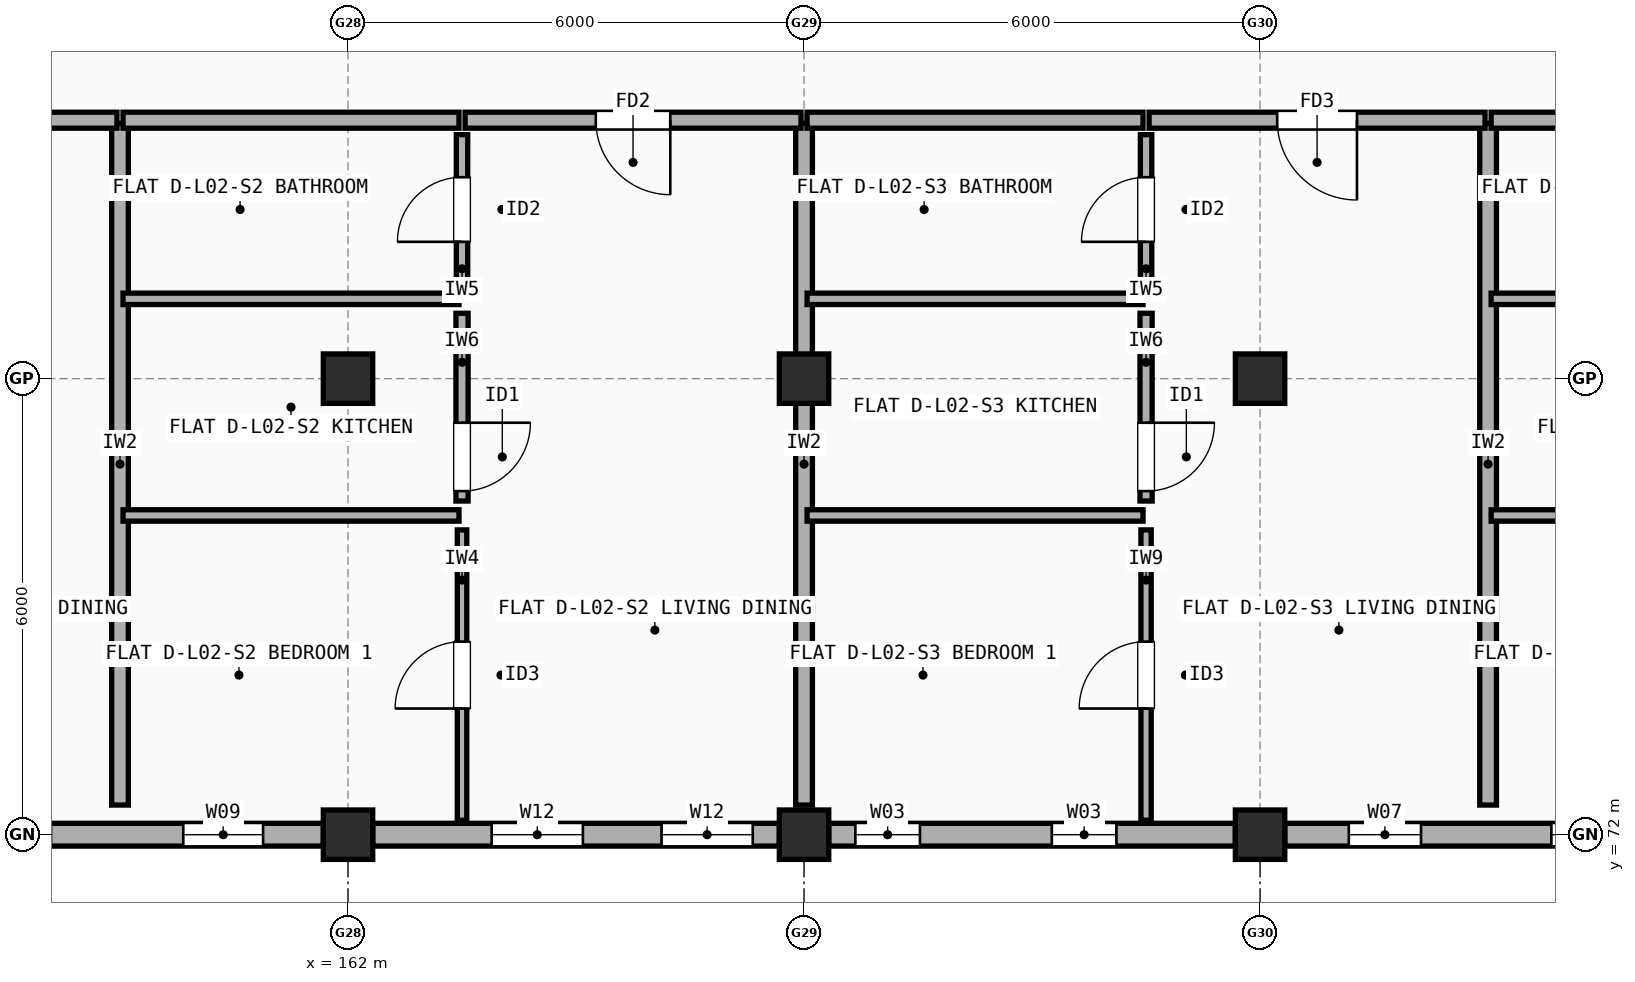
"""IFC4 building model, lengths in metres.
Left out: names, types, materials, properties, quantities, classifications, styles, units other than length and angle.
Written with IfcOpenShell. Run it as: python <this file> out.ifc"""

import sys

from ifc_helpers import new_model, si_unit, direction, frame, frame_2d, origin, origin_2d, place, context, subcontext, project, spatial, rectangle, extrude, element, fill, save


model = new_model("IFC4")
c1 = context("Model", 3, precision=1e-05, world=origin(), true_north=direction((0.0, 1.0)))
c2 = subcontext(c1, "Body", "Model", "MODEL_VIEW")
j1 = project(units=[si_unit("LENGTHUNIT", "METRE"), si_unit("PLANEANGLEUNIT", "RADIAN")], contexts=[c1])
p1 = place(None, origin())
s1 = spatial("IfcSite", under=j1, at=p1, CompositionType="ELEMENT")
p2 = place(p1, origin())
s2 = spatial("IfcBuilding", under=s1, at=p2, CompositionType="ELEMENT")
p3 = place(p2, frame((0.0, 0.0, 7.7)))
s3 = spatial("IfcBuildingStorey", under=s2, at=p3, CompositionType="ELEMENT", Elevation=7.7)
for number, where, z_axis, x_axis in (
    (1, (162.0, 72.0, 0.0), (0.0, 0.0, 1.0), (1.0, 0.0, 0.0)),
    (2, (162.0, 78.0, 0.0), (0.0, 0.0, 1.0), (1.0, 0.0, 0.0)),
    (3, (168.0, 72.0, 0.0), (0.0, 0.0, 1.0), (1.0, 0.0, 0.0)),
    (4, (168.0, 78.0, 0.0), (0.0, 0.0, 1.0), (1.0, 0.0, 0.0)),
    (5, (174.0, 72.0, 0.0), (0.0, 0.0, 1.0), (1.0, 0.0, 0.0)),
    (6, (174.0, 78.0, 0.0), (0.0, 0.0, 1.0), (1.0, 0.0, 0.0)),
):
    element("IfcColumn", number, at=place(p3, frame(where, z_axis=z_axis, x_axis=x_axis)), inside=s3, PredefinedType="COLUMN", context=c2, shape_type="SweptSolid", body=[
        extrude(rectangle(XDim=0.65, YDim=0.65, at=origin_2d()), origin(), (0.0, 0.0, 1.0), 2.955),
    ])
p4 = place(p3, frame((156.275, 72.0, 0.0), z_axis=(0.0, 0.0, 1.0), x_axis=(1.0, 0.0, 0.0)))
e7 = element("IfcWall", 7, at=p4, inside=s3, PredefinedType="STANDARD", context=c2, shape_type="SweptSolid", body=[
    extrude(rectangle(XDim=5.4, YDim=0.3, at=frame_2d((2.7, 0.0))), origin(), (0.0, 0.0, 1.0), 2.437),
])
p5 = place(p4, frame((0.867, 0.0, 0.9)))
e8 = element("IfcOpeningElement", 8, at=p5, cuts=e7, PredefinedType="OPENING", context=c2, shape_type="SweptSolid", body=[
    extrude(rectangle(XDim=0.95, YDim=1.35, at=frame_2d((0.475, 0.675))), frame((0.0, 0.16, 0.0), z_axis=(0.0, -1.0, 0.0), x_axis=(1.0, 0.0, 0.0)), (0.0, 0.0, 1.0), 0.32),
])
p6 = place(p4, frame((3.558, 0.0, 0.9)))
e9 = element("IfcOpeningElement", 9, at=p6, cuts=e7, PredefinedType="OPENING", context=c2, shape_type="SweptSolid", body=[
    extrude(rectangle(XDim=1.05, YDim=1.35, at=frame_2d((0.525, 0.675))), frame((0.0, 0.16, 0.0), z_axis=(0.0, -1.0, 0.0), x_axis=(1.0, 0.0, 0.0)), (0.0, 0.0, 1.0), 0.32),
])
p7 = place(p3, frame((162.325, 72.0, 0.0), z_axis=(0.0, 0.0, 1.0), x_axis=(1.0, 0.0, 0.0)))
e10 = element("IfcWall", 10, at=p7, inside=s3, PredefinedType="STANDARD", context=c2, shape_type="SweptSolid", body=[
    extrude(rectangle(XDim=5.35, YDim=0.3, at=frame_2d((2.675, 0.0))), origin(), (0.0, 0.0, 1.0), 2.437),
])
p8 = place(p7, frame((1.565, 0.0, 0.9)))
e11 = element("IfcOpeningElement", 11, at=p8, cuts=e10, PredefinedType="OPENING", context=c2, shape_type="SweptSolid", body=[
    extrude(rectangle(XDim=1.2, YDim=1.35, at=frame_2d((0.6, 0.675))), frame((0.0, 0.16, 0.0), z_axis=(0.0, -1.0, 0.0), x_axis=(1.0, 0.0, 0.0)), (0.0, 0.0, 1.0), 0.32),
])
p9 = place(p7, frame((3.8, 0.0, 0.9)))
e12 = element("IfcOpeningElement", 12, at=p9, cuts=e10, PredefinedType="OPENING", context=c2, shape_type="SweptSolid", body=[
    extrude(rectangle(XDim=1.2, YDim=1.35, at=frame_2d((0.6, 0.675))), frame((0.0, 0.16, 0.0), z_axis=(0.0, -1.0, 0.0), x_axis=(1.0, 0.0, 0.0)), (0.0, 0.0, 1.0), 0.32),
])
p10 = place(p3, frame((168.325, 72.0, 0.0), z_axis=(0.0, 0.0, 1.0), x_axis=(1.0, 0.0, 0.0)))
e13 = element("IfcWall", 13, at=p10, inside=s3, PredefinedType="STANDARD", context=c2, shape_type="SweptSolid", body=[
    extrude(rectangle(XDim=5.35, YDim=0.3, at=frame_2d((2.675, 0.0))), origin(), (0.0, 0.0, 1.0), 2.437),
])
p11 = place(p10, frame((0.35, 0.0, 0.9)))
e14 = element("IfcOpeningElement", 14, at=p11, cuts=e13, PredefinedType="OPENING", context=c2, shape_type="SweptSolid", body=[
    extrude(rectangle(XDim=0.85, YDim=1.25, at=frame_2d((0.425, 0.625))), frame((0.0, 0.16, 0.0), z_axis=(0.0, -1.0, 0.0), x_axis=(1.0, 0.0, 0.0)), (0.0, 0.0, 1.0), 0.32),
])
p12 = place(p10, frame((2.935, 0.0, 0.9)))
e15 = element("IfcOpeningElement", 15, at=p12, cuts=e13, PredefinedType="OPENING", context=c2, shape_type="SweptSolid", body=[
    extrude(rectangle(XDim=0.85, YDim=1.25, at=frame_2d((0.425, 0.625))), frame((0.0, 0.16, 0.0), z_axis=(0.0, -1.0, 0.0), x_axis=(1.0, 0.0, 0.0)), (0.0, 0.0, 1.0), 0.32),
])
p13 = place(p3, frame((174.325, 72.0, 0.0), z_axis=(0.0, 0.0, 1.0), x_axis=(1.0, 0.0, 0.0)))
e16 = element("IfcWall", 16, at=p13, inside=s3, PredefinedType="STANDARD", context=c2, shape_type="SweptSolid", body=[
    extrude(rectangle(XDim=5.35, YDim=0.3, at=frame_2d((2.675, 0.0))), origin(), (0.0, 0.0, 1.0), 2.437),
])
p14 = place(p13, frame((0.843, 0.0, 0.9)))
e17 = element("IfcOpeningElement", 17, at=p14, cuts=e16, PredefinedType="OPENING", context=c2, shape_type="SweptSolid", body=[
    extrude(rectangle(XDim=0.95, YDim=1.35, at=frame_2d((0.475, 0.675))), frame((0.0, 0.16, 0.0), z_axis=(0.0, -1.0, 0.0), x_axis=(1.0, 0.0, 0.0)), (0.0, 0.0, 1.0), 0.32),
])
p15 = place(p13, frame((3.508, 0.0, 0.9)))
e18 = element("IfcOpeningElement", 18, at=p15, cuts=e16, PredefinedType="OPENING", context=c2, shape_type="SweptSolid", body=[
    extrude(rectangle(XDim=1.05, YDim=1.35, at=frame_2d((0.525, 0.675))), frame((0.0, 0.16, 0.0), z_axis=(0.0, -1.0, 0.0), x_axis=(1.0, 0.0, 0.0)), (0.0, 0.0, 1.0), 0.32),
])
p16 = place(p3, frame((159.0, 72.39, 0.0), z_axis=(0.0, 0.0, 1.0), x_axis=(0.0, 1.0, 0.0)))
e19 = element("IfcWall", 19, at=p16, inside=s3, PredefinedType="SOLIDWALL", context=c2, shape_type="SweptSolid", body=[
    extrude(rectangle(XDim=8.97, YDim=0.22, at=frame_2d((4.485, 0.0))), origin(), (0.0, 0.0, 1.0), 2.437),
])
p17 = place(p3, frame((154.54, 81.4, 0.0), z_axis=(0.0, 0.0, 1.0), x_axis=(1.0, 0.0, 0.0)))
e20 = element("IfcWall", 20, at=p17, inside=s3, PredefinedType="SOLIDWALL", context=c2, shape_type="SweptSolid", body=[
    extrude(rectangle(XDim=4.42, YDim=0.21, at=frame_2d((2.21, 0.0))), origin(), (0.0, 0.0, 1.0), 2.437),
])
p18 = place(p17, frame((1.71, 0.0, 0.0)))
e21 = element("IfcOpeningElement", 21, at=p18, cuts=e20, PredefinedType="OPENING", context=c2, shape_type="SweptSolid", body=[
    extrude(rectangle(XDim=1.0, YDim=2.15, at=frame_2d((0.5, 1.075))), frame((0.0, 0.115, 0.0), z_axis=(0.0, -1.0, 0.0), x_axis=(1.0, 0.0, 0.0)), (0.0, 0.0, 1.0), 0.23),
])
p19 = place(p3, frame((168.0, 72.39, 0.0), z_axis=(0.0, 0.0, 1.0), x_axis=(0.0, 1.0, 0.0)))
e22 = element("IfcWall", 22, at=p19, inside=s3, PredefinedType="SOLIDWALL", context=c2, shape_type="SweptSolid", body=[
    extrude(rectangle(XDim=8.97, YDim=0.22, at=frame_2d((4.485, 0.0))), origin(), (0.0, 0.0, 1.0), 2.337),
])
p20 = place(p3, frame((159.04, 81.4, 0.0), z_axis=(0.0, 0.0, 1.0), x_axis=(1.0, 0.0, 0.0)))
e23 = element("IfcWall", 23, at=p20, inside=s3, PredefinedType="SOLIDWALL", context=c2, shape_type="SweptSolid", body=[
    extrude(rectangle(XDim=4.42, YDim=0.21, at=frame_2d((2.21, 0.0))), origin(), (0.0, 0.0, 1.0), 2.337),
])
p21 = place(p3, frame((163.54, 81.4, 0.0), z_axis=(0.0, 0.0, 1.0), x_axis=(1.0, 0.0, 0.0)))
e24 = element("IfcWall", 24, at=p21, inside=s3, PredefinedType="SOLIDWALL", context=c2, shape_type="SweptSolid", body=[
    extrude(rectangle(XDim=4.42, YDim=0.21, at=frame_2d((2.21, 0.0))), origin(), (0.0, 0.0, 1.0), 2.337),
])
p22 = place(p21, frame((1.72, 0.0, 0.0)))
e25 = element("IfcOpeningElement", 25, at=p22, cuts=e24, PredefinedType="OPENING", context=c2, shape_type="SweptSolid", body=[
    extrude(rectangle(XDim=0.98, YDim=2.15, at=frame_2d((0.49, 1.075))), frame((0.0, 0.115, 0.0), z_axis=(0.0, -1.0, 0.0), x_axis=(1.0, 0.0, 0.0)), (0.0, 0.0, 1.0), 0.23),
])
p23 = place(p3, frame((163.5, 72.19, 0.0), z_axis=(0.0, 0.0, 1.0), x_axis=(0.0, 1.0, 0.0)))
e26 = element("IfcWall", 26, at=p23, inside=s3, PredefinedType="PARTITIONING", context=c2, shape_type="SweptSolid", body=[
    extrude(rectangle(XDim=3.82, YDim=0.125, at=frame_2d((1.91, 0.0))), origin(), (0.0, 0.0, 1.0), 2.955),
])
p24 = place(p23, frame((1.47, 0.0, 0.0)))
e27 = element("IfcOpeningElement", 27, at=p24, cuts=e26, PredefinedType="OPENING", context=c2, shape_type="SweptSolid", body=[
    extrude(rectangle(XDim=0.88, YDim=2.1, at=frame_2d((0.44, 1.05))), frame((0.0, 0.073, 0.0), z_axis=(0.0, -1.0, 0.0), x_axis=(1.0, 0.0, 0.0)), (0.0, 0.0, 1.0), 0.145),
])
p25 = place(p3, frame((163.5, 76.39, 0.0), z_axis=(0.0, 0.0, 1.0), x_axis=(0.0, 1.0, 0.0)))
e28 = element("IfcWall", 28, at=p25, inside=s3, PredefinedType="PLUMBINGWALL", context=c2, shape_type="SweptSolid", body=[
    extrude(rectangle(XDim=2.47, YDim=0.16, at=frame_2d((1.235, 0.0))), origin(), (0.0, 0.0, 1.0), 2.437),
])
p26 = place(p25, frame((0.13, 0.0, 0.0)))
e29 = element("IfcOpeningElement", 29, at=p26, cuts=e28, PredefinedType="OPENING", context=c2, shape_type="SweptSolid", body=[
    extrude(rectangle(XDim=0.9, YDim=2.1, at=frame_2d((0.45, 1.05))), frame((0.0, 0.09, 0.0), z_axis=(0.0, -1.0, 0.0), x_axis=(1.0, 0.0, 0.0)), (0.0, 0.0, 1.0), 0.18),
])
p27 = place(p3, frame((163.5, 79.24, 0.0), z_axis=(0.0, 0.0, 1.0), x_axis=(0.0, 1.0, 0.0)))
e30 = element("IfcWall", 30, at=p27, inside=s3, PredefinedType="PARTITIONING", context=c2, shape_type="SweptSolid", body=[
    extrude(rectangle(XDim=1.97, YDim=0.15, at=frame_2d((0.985, 0.0))), origin(), (0.0, 0.0, 1.0), 2.955),
])
p28 = place(p27, frame((0.56, 0.0, 0.0)))
e31 = element("IfcOpeningElement", 31, at=p28, cuts=e30, PredefinedType="OPENING", context=c2, shape_type="SweptSolid", body=[
    extrude(rectangle(XDim=0.85, YDim=2.1, at=frame_2d((0.425, 1.05))), frame((0.0, 0.085, 0.0), z_axis=(0.0, -1.0, 0.0), x_axis=(1.0, 0.0, 0.0)), (0.0, 0.0, 1.0), 0.17),
])
for number, where, z_axis, x_axis in (
    (32, (159.04, 76.2, 0.0), (0.0, 0.0, 1.0), (1.0, 0.0, 0.0)),
    (33, (159.04, 79.05, 0.0), (0.0, 0.0, 1.0), (1.0, 0.0, 0.0)),
):
    element("IfcWall", number, at=place(p3, frame(where, z_axis=z_axis, x_axis=x_axis)), inside=s3, PredefinedType="PARTITIONING", context=c2, shape_type="SweptSolid", body=[
        extrude(rectangle(XDim=4.42, YDim=0.15, at=frame_2d((2.21, 0.0))), origin(), (0.0, 0.0, 1.0), 2.337),
    ])
p29 = place(p3, frame((177.0, 72.39, 0.0), z_axis=(0.0, 0.0, 1.0), x_axis=(0.0, 1.0, 0.0)))
e34 = element("IfcWall", 34, at=p29, inside=s3, PredefinedType="SOLIDWALL", context=c2, shape_type="SweptSolid", body=[
    extrude(rectangle(XDim=8.97, YDim=0.22, at=frame_2d((4.485, 0.0))), origin(), (0.0, 0.0, 1.0), 2.437),
])
p30 = place(p3, frame((168.04, 81.4, 0.0), z_axis=(0.0, 0.0, 1.0), x_axis=(1.0, 0.0, 0.0)))
e35 = element("IfcWall", 35, at=p30, inside=s3, PredefinedType="SOLIDWALL", context=c2, shape_type="SweptSolid", body=[
    extrude(rectangle(XDim=4.42, YDim=0.21, at=frame_2d((2.21, 0.0))), origin(), (0.0, 0.0, 1.0), 2.337),
])
p31 = place(p3, frame((172.54, 81.4, 0.0), z_axis=(0.0, 0.0, 1.0), x_axis=(1.0, 0.0, 0.0)))
e36 = element("IfcWall", 36, at=p31, inside=s3, PredefinedType="SOLIDWALL", context=c2, shape_type="SweptSolid", body=[
    extrude(rectangle(XDim=4.42, YDim=0.21, at=frame_2d((2.21, 0.0))), origin(), (0.0, 0.0, 1.0), 2.337),
])
p32 = place(p31, frame((1.685, 0.0, 0.0)))
e37 = element("IfcOpeningElement", 37, at=p32, cuts=e36, PredefinedType="OPENING", context=c2, shape_type="SweptSolid", body=[
    extrude(rectangle(XDim=1.05, YDim=2.15, at=frame_2d((0.525, 1.075))), frame((0.0, 0.115, 0.0), z_axis=(0.0, -1.0, 0.0), x_axis=(1.0, 0.0, 0.0)), (0.0, 0.0, 1.0), 0.23),
])
p33 = place(p3, frame((172.5, 72.19, 0.0), z_axis=(0.0, 0.0, 1.0), x_axis=(0.0, 1.0, 0.0)))
e38 = element("IfcWall", 38, at=p33, inside=s3, PredefinedType="PARTITIONING", context=c2, shape_type="SweptSolid", body=[
    extrude(rectangle(XDim=3.82, YDim=0.135, at=frame_2d((1.91, 0.0))), origin(), (0.0, 0.0, 1.0), 2.955),
])
p34 = place(p33, frame((1.47, 0.0, 0.0)))
e39 = element("IfcOpeningElement", 39, at=p34, cuts=e38, PredefinedType="OPENING", context=c2, shape_type="SweptSolid", body=[
    extrude(rectangle(XDim=0.88, YDim=2.1, at=frame_2d((0.44, 1.05))), frame((0.0, 0.077, 0.0), z_axis=(0.0, -1.0, 0.0), x_axis=(1.0, 0.0, 0.0)), (0.0, 0.0, 1.0), 0.155),
])
p35 = place(p3, frame((172.5, 76.39, 0.0), z_axis=(0.0, 0.0, 1.0), x_axis=(0.0, 1.0, 0.0)))
e40 = element("IfcWall", 40, at=p35, inside=s3, PredefinedType="PLUMBINGWALL", context=c2, shape_type="SweptSolid", body=[
    extrude(rectangle(XDim=2.47, YDim=0.16, at=frame_2d((1.235, 0.0))), origin(), (0.0, 0.0, 1.0), 2.437),
])
p36 = place(p35, frame((0.13, 0.0, 0.0)))
e41 = element("IfcOpeningElement", 41, at=p36, cuts=e40, PredefinedType="OPENING", context=c2, shape_type="SweptSolid", body=[
    extrude(rectangle(XDim=0.9, YDim=2.1, at=frame_2d((0.45, 1.05))), frame((0.0, 0.09, 0.0), z_axis=(0.0, -1.0, 0.0), x_axis=(1.0, 0.0, 0.0)), (0.0, 0.0, 1.0), 0.18),
])
p37 = place(p3, frame((172.5, 79.24, 0.0), z_axis=(0.0, 0.0, 1.0), x_axis=(0.0, 1.0, 0.0)))
e42 = element("IfcWall", 42, at=p37, inside=s3, PredefinedType="PARTITIONING", context=c2, shape_type="SweptSolid", body=[
    extrude(rectangle(XDim=1.97, YDim=0.15, at=frame_2d((0.985, 0.0))), origin(), (0.0, 0.0, 1.0), 2.955),
])
p38 = place(p37, frame((0.56, 0.0, 0.0)))
e43 = element("IfcOpeningElement", 43, at=p38, cuts=e42, PredefinedType="OPENING", context=c2, shape_type="SweptSolid", body=[
    extrude(rectangle(XDim=0.85, YDim=2.1, at=frame_2d((0.425, 1.05))), frame((0.0, 0.085, 0.0), z_axis=(0.0, -1.0, 0.0), x_axis=(1.0, 0.0, 0.0)), (0.0, 0.0, 1.0), 0.17),
])
for number, where, z_axis, x_axis in (
    (44, (168.04, 76.2, 0.0), (0.0, 0.0, 1.0), (1.0, 0.0, 0.0)),
    (45, (168.04, 79.05, 0.0), (0.0, 0.0, 1.0), (1.0, 0.0, 0.0)),
):
    element("IfcWall", number, at=place(p3, frame(where, z_axis=z_axis, x_axis=x_axis)), inside=s3, PredefinedType="PARTITIONING", context=c2, shape_type="SweptSolid", body=[
        extrude(rectangle(XDim=4.42, YDim=0.15, at=frame_2d((2.21, 0.0))), origin(), (0.0, 0.0, 1.0), 2.337),
    ])
p39 = place(p3, frame((177.04, 81.4, 0.0), z_axis=(0.0, 0.0, 1.0), x_axis=(1.0, 0.0, 0.0)))
e46 = element("IfcWall", 46, at=p39, inside=s3, PredefinedType="SOLIDWALL", context=c2, shape_type="SweptSolid", body=[
    extrude(rectangle(XDim=4.42, YDim=0.21, at=frame_2d((2.21, 0.0))), origin(), (0.0, 0.0, 1.0), 2.337),
])
for number, where, z_axis, x_axis in (
    (47, (177.04, 76.2, 0.0), (0.0, 0.0, 1.0), (1.0, 0.0, 0.0)),
    (48, (177.04, 79.05, 0.0), (0.0, 0.0, 1.0), (1.0, 0.0, 0.0)),
):
    element("IfcWall", number, at=place(p3, frame(where, z_axis=z_axis, x_axis=x_axis)), inside=s3, PredefinedType="PARTITIONING", context=c2, shape_type="SweptSolid", body=[
        extrude(rectangle(XDim=4.42, YDim=0.15, at=frame_2d((2.21, 0.0))), origin(), (0.0, 0.0, 1.0), 2.337),
    ])
p40 = place(p6, origin())
e49 = element("IfcWindow", 49, at=p40, inside=s3, PartitioningType="SINGLE_PANEL", PredefinedType="WINDOW", context=c2, shape_type="SweptSolid", body=[
    extrude(rectangle(XDim=1.05, YDim=1.35, at=frame_2d((0.525, 0.675))), frame((0.0, 0.03, 0.0), z_axis=(0.0, -1.0, 0.0), x_axis=(1.0, 0.0, 0.0)), (0.0, 0.0, 1.0), 0.06),
])
fill(e9, e49)
p41 = place(p8, origin())
e50 = element("IfcWindow", 50, at=p41, inside=s3, PartitioningType="SINGLE_PANEL", PredefinedType="WINDOW", context=c2, shape_type="SweptSolid", body=[
    extrude(rectangle(XDim=1.2, YDim=1.35, at=frame_2d((0.6, 0.675))), frame((0.0, 0.03, 0.0), z_axis=(0.0, -1.0, 0.0), x_axis=(1.0, 0.0, 0.0)), (0.0, 0.0, 1.0), 0.06),
])
fill(e11, e50)
p42 = place(p9, origin())
e51 = element("IfcWindow", 51, at=p42, inside=s3, PartitioningType="SINGLE_PANEL", PredefinedType="WINDOW", context=c2, shape_type="SweptSolid", body=[
    extrude(rectangle(XDim=1.2, YDim=1.35, at=frame_2d((0.6, 0.675))), frame((0.0, 0.03, 0.0), z_axis=(0.0, -1.0, 0.0), x_axis=(1.0, 0.0, 0.0)), (0.0, 0.0, 1.0), 0.06),
])
fill(e12, e51)
p43 = place(p11, origin())
e52 = element("IfcWindow", 52, at=p43, inside=s3, PartitioningType="SINGLE_PANEL", PredefinedType="WINDOW", context=c2, shape_type="SweptSolid", body=[
    extrude(rectangle(XDim=0.85, YDim=1.25, at=frame_2d((0.425, 0.625))), frame((0.0, 0.03, 0.0), z_axis=(0.0, -1.0, 0.0), x_axis=(1.0, 0.0, 0.0)), (0.0, 0.0, 1.0), 0.06),
])
fill(e14, e52)
p44 = place(p12, origin())
e53 = element("IfcWindow", 53, at=p44, inside=s3, PartitioningType="SINGLE_PANEL", PredefinedType="WINDOW", context=c2, shape_type="SweptSolid", body=[
    extrude(rectangle(XDim=0.85, YDim=1.25, at=frame_2d((0.425, 0.625))), frame((0.0, 0.03, 0.0), z_axis=(0.0, -1.0, 0.0), x_axis=(1.0, 0.0, 0.0)), (0.0, 0.0, 1.0), 0.06),
])
fill(e15, e53)
p45 = place(p14, origin())
e54 = element("IfcWindow", 54, at=p45, inside=s3, PartitioningType="SINGLE_PANEL", PredefinedType="WINDOW", context=c2, shape_type="SweptSolid", body=[
    extrude(rectangle(XDim=0.95, YDim=1.35, at=frame_2d((0.475, 0.675))), frame((0.0, 0.03, 0.0), z_axis=(0.0, -1.0, 0.0), x_axis=(1.0, 0.0, 0.0)), (0.0, 0.0, 1.0), 0.06),
])
fill(e17, e54)
p46 = place(p15, origin())
e55 = element("IfcWindow", 55, at=p46, inside=s3, PartitioningType="SINGLE_PANEL", PredefinedType="WINDOW", context=c2, shape_type="SweptSolid", body=[
    extrude(rectangle(XDim=1.05, YDim=1.35, at=frame_2d((0.525, 0.675))), frame((0.0, 0.03, 0.0), z_axis=(0.0, -1.0, 0.0), x_axis=(1.0, 0.0, 0.0)), (0.0, 0.0, 1.0), 0.06),
])
fill(e18, e55)
p47 = place(p22, origin())
e56 = element("IfcDoor", 56, at=p47, inside=s3, OperationType="SINGLE_SWING_RIGHT", PredefinedType="DOOR", context=c2, shape_type="SweptSolid", body=[
    extrude(rectangle(XDim=0.98, YDim=2.15, at=frame_2d((0.49, 1.075))), frame((0.0, 0.025, 0.0), z_axis=(0.0, -1.0, 0.0), x_axis=(1.0, 0.0, 0.0)), (0.0, 0.0, 1.0), 0.05),
])
fill(e25, e56)
p48 = place(p24, origin())
e57 = element("IfcDoor", 57, at=p48, inside=s3, OperationType="SINGLE_SWING_LEFT", PredefinedType="DOOR", context=c2, shape_type="SweptSolid", body=[
    extrude(rectangle(XDim=0.88, YDim=2.1, at=frame_2d((0.44, 1.05))), frame((0.0, 0.025, 0.0), z_axis=(0.0, -1.0, 0.0), x_axis=(1.0, 0.0, 0.0)), (0.0, 0.0, 1.0), 0.05),
])
fill(e27, e57)
p49 = place(p26, origin())
e58 = element("IfcDoor", 58, at=p49, inside=s3, OperationType="SINGLE_SWING_RIGHT", PredefinedType="DOOR", context=c2, shape_type="SweptSolid", body=[
    extrude(rectangle(XDim=0.9, YDim=2.1, at=frame_2d((0.45, 1.05))), frame((0.0, 0.025, 0.0), z_axis=(0.0, -1.0, 0.0), x_axis=(1.0, 0.0, 0.0)), (0.0, 0.0, 1.0), 0.05),
])
fill(e29, e58)
p50 = place(p28, origin())
e59 = element("IfcDoor", 59, at=p50, inside=s3, OperationType="SINGLE_SWING_LEFT", PredefinedType="DOOR", context=c2, shape_type="SweptSolid", body=[
    extrude(rectangle(XDim=0.85, YDim=2.1, at=frame_2d((0.425, 1.05))), frame((0.0, 0.025, 0.0), z_axis=(0.0, -1.0, 0.0), x_axis=(1.0, 0.0, 0.0)), (0.0, 0.0, 1.0), 0.05),
])
fill(e31, e59)
p51 = place(p32, origin())
e60 = element("IfcDoor", 60, at=p51, inside=s3, OperationType="SINGLE_SWING_RIGHT", PredefinedType="DOOR", context=c2, shape_type="SweptSolid", body=[
    extrude(rectangle(XDim=1.05, YDim=2.15, at=frame_2d((0.525, 1.075))), frame((0.0, 0.025, 0.0), z_axis=(0.0, -1.0, 0.0), x_axis=(1.0, 0.0, 0.0)), (0.0, 0.0, 1.0), 0.05),
])
fill(e37, e60)
p52 = place(p34, origin())
e61 = element("IfcDoor", 61, at=p52, inside=s3, OperationType="SINGLE_SWING_LEFT", PredefinedType="DOOR", context=c2, shape_type="SweptSolid", body=[
    extrude(rectangle(XDim=0.88, YDim=2.1, at=frame_2d((0.44, 1.05))), frame((0.0, 0.025, 0.0), z_axis=(0.0, -1.0, 0.0), x_axis=(1.0, 0.0, 0.0)), (0.0, 0.0, 1.0), 0.05),
])
fill(e39, e61)
p53 = place(p36, origin())
e62 = element("IfcDoor", 62, at=p53, inside=s3, OperationType="SINGLE_SWING_RIGHT", PredefinedType="DOOR", context=c2, shape_type="SweptSolid", body=[
    extrude(rectangle(XDim=0.9, YDim=2.1, at=frame_2d((0.45, 1.05))), frame((0.0, 0.025, 0.0), z_axis=(0.0, -1.0, 0.0), x_axis=(1.0, 0.0, 0.0)), (0.0, 0.0, 1.0), 0.05),
])
fill(e41, e62)
p54 = place(p38, origin())
e63 = element("IfcDoor", 63, at=p54, inside=s3, OperationType="SINGLE_SWING_LEFT", PredefinedType="DOOR", context=c2, shape_type="SweptSolid", body=[
    extrude(rectangle(XDim=0.85, YDim=2.1, at=frame_2d((0.425, 1.05))), frame((0.0, 0.025, 0.0), z_axis=(0.0, -1.0, 0.0), x_axis=(1.0, 0.0, 0.0)), (0.0, 0.0, 1.0), 0.05),
])
fill(e43, e63)
save(model, sys.argv[1])
